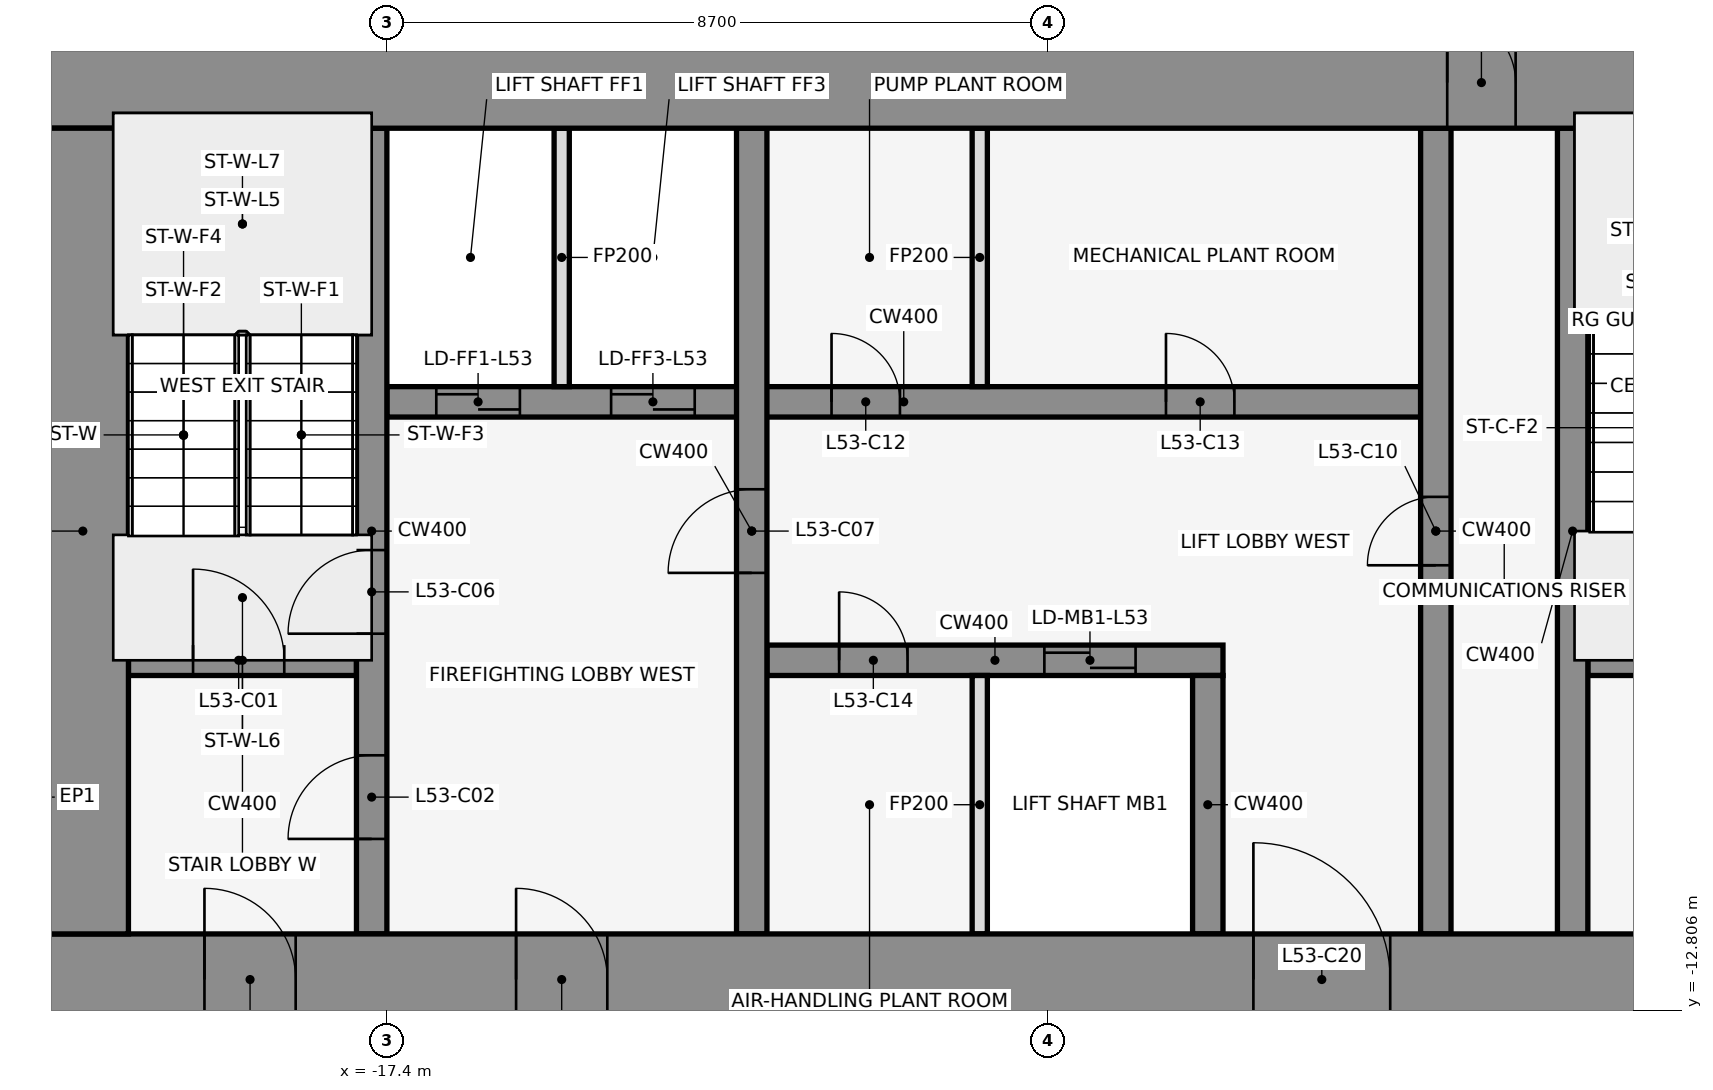
"""IFC4 building model, lengths in metres.
Left out: names, types, materials, properties, quantities, classifications, styles, units other than length and angle.
Written with IfcOpenShell. Run it as: python <this file> out.ifc"""

import sys

from ifc_helpers import new_model, si_unit, direction, frame, frame_2d, origin, place, context, subcontext, project, spatial, rectangle, extrude, element, fill, save


model = new_model("IFC4")
c1 = context("Model", 3, precision=1e-05, world=origin(), true_north=direction((0.0, 1.0)))
c2 = subcontext(c1, "Body", "Model", "MODEL_VIEW")
j1 = project(units=[si_unit("LENGTHUNIT", "METRE"), si_unit("PLANEANGLEUNIT", "RADIAN")], contexts=[c1])
p1 = place(None, origin())
s1 = spatial("IfcSite", under=j1, at=p1, CompositionType="ELEMENT")
p2 = place(p1, origin())
s2 = spatial("IfcBuilding", under=s1, at=p2, CompositionType="ELEMENT")
p3 = place(p2, frame((0.0, 0.0, 236.0)))
s3 = spatial("IfcBuildingStorey", under=s2, at=p3, CompositionType="ELEMENT", Elevation=236.0)
for number, where, z_axis, x_axis in (
    (1, (-0.068, -0.105, 0.0), (0.0, 0.0, 1.0), (-0.84, 0.543, 0.0)),
    (2, (-14.599, 1.08, 0.0), (0.0, 0.0, 1.0), (-0.84, -0.543, 0.0)),
):
    element("IfcWall", number, at=place(p3, frame(where, z_axis=z_axis, x_axis=x_axis)), inside=s3, PredefinedType="STANDARD", context=c2, shape_type="SweptSolid", body=[
        extrude(rectangle(XDim=2.183, YDim=0.25, at=frame_2d((1.091, 0.0))), origin(), (0.0, 0.0, 1.0), 5.25),
    ])
p4 = place(p3, frame((-20.8, -8.2, 0.0), z_axis=(0.0, 0.0, 1.0), x_axis=(1.0, 0.0, 0.0)))
e3 = element("IfcWall", 3, at=p4, inside=s3, PredefinedType="SHEAR", context=c2, shape_type="SweptSolid", body=[
    extrude(rectangle(XDim=3.0, YDim=0.4, at=frame_2d((1.5, 0.0))), origin(), (0.0, 0.0, 1.0), 5.4),
])
p5 = place(p4, frame((0.85, 0.0, 0.0)))
e4 = element("IfcOpeningElement", 4, at=p5, cuts=e3, PredefinedType="OPENING", context=c2, shape_type="SweptSolid", body=[
    extrude(rectangle(XDim=1.2, YDim=2.1, at=frame_2d((0.6, 1.05))), frame((0.0, 0.212, 0.0), z_axis=(0.0, -1.0, 0.0), x_axis=(1.0, 0.0, 0.0)), (0.0, 0.0, 1.0), 0.424),
])
p6 = place(p3, frame((-12.4, -8.2, 0.0), z_axis=(0.0, 0.0, 1.0), x_axis=(1.0, 0.0, 0.0)))
e5 = element("IfcWall", 5, at=p6, inside=s3, PredefinedType="SHEAR", context=c2, shape_type="SweptSolid", body=[
    extrude(rectangle(XDim=6.0, YDim=0.4, at=frame_2d((3.0, 0.0))), origin(), (0.0, 0.0, 1.0), 5.4),
])
p7 = place(p6, frame((3.65, 0.0, 0.0)))
e6 = element("IfcOpeningElement", 6, at=p7, cuts=e5, PredefinedType="OPENING", context=c2, shape_type="SweptSolid", body=[
    extrude(rectangle(XDim=1.2, YDim=2.1, at=frame_2d((0.6, 1.05))), frame((0.0, 0.212, 0.0), z_axis=(0.0, -1.0, 0.0), x_axis=(1.0, 0.0, 0.0)), (0.0, 0.0, 1.0), 0.424),
])
p8 = place(p6, frame((0.95, 0.0, 0.0)))
e7 = element("IfcOpeningElement", 7, at=p8, cuts=e5, PredefinedType="OPENING", context=c2, shape_type="SweptSolid", body=[
    extrude(rectangle(XDim=0.9, YDim=2.1, at=frame_2d((0.45, 1.05))), frame((0.0, 0.212, 0.0), z_axis=(0.0, -1.0, 0.0), x_axis=(1.0, 0.0, 0.0)), (0.0, 0.0, 1.0), 0.424),
])
p9 = place(p3, frame((-1.6, -8.2, 0.0), z_axis=(0.0, 0.0, 1.0), x_axis=(1.0, 0.0, 0.0)))
e8 = element("IfcWall", 8, at=p9, inside=s3, PredefinedType="SHEAR", context=c2, shape_type="SweptSolid", body=[
    extrude(rectangle(XDim=3.2, YDim=0.4, at=frame_2d((1.6, 0.0))), origin(), (0.0, 0.0, 1.0), 5.4),
])
p10 = place(p9, frame((1.05, 0.0, 0.0)))
e9 = element("IfcOpeningElement", 9, at=p10, cuts=e8, PredefinedType="OPENING", context=c2, shape_type="SweptSolid", body=[
    extrude(rectangle(XDim=1.2, YDim=2.1, at=frame_2d((0.6, 1.05))), frame((0.0, 0.212, 0.0), z_axis=(0.0, -1.0, 0.0), x_axis=(1.0, 0.0, 0.0)), (0.0, 0.0, 1.0), 0.424),
])
p11 = place(p3, frame((-17.4, -4.8, 0.0), z_axis=(0.0, 0.0, 1.0), x_axis=(1.0, 0.0, 0.0)))
e10 = element("IfcWall", 10, at=p11, inside=s3, PredefinedType="SHEAR", context=c2, shape_type="SweptSolid", body=[
    extrude(rectangle(XDim=13.6, YDim=0.4, at=frame_2d((6.8, 0.0))), origin(), (0.0, 0.0, 1.0), 5.4),
])
p12 = place(p11, frame((0.65, 0.0, 0.0)))
e11 = element("IfcOpeningElement", 11, at=p12, cuts=e10, PredefinedType="OPENING", context=c2, shape_type="SweptSolid", body=[
    extrude(rectangle(XDim=1.1, YDim=2.1, at=frame_2d((0.55, 1.05))), frame((0.0, 0.212, 0.0), z_axis=(0.0, -1.0, 0.0), x_axis=(1.0, 0.0, 0.0)), (0.0, 0.0, 1.0), 0.424),
])
p13 = place(p11, frame((2.95, 0.0, 0.0)))
e12 = element("IfcOpeningElement", 12, at=p13, cuts=e10, PredefinedType="OPENING", context=c2, shape_type="SweptSolid", body=[
    extrude(rectangle(XDim=1.1, YDim=2.1, at=frame_2d((0.55, 1.05))), frame((0.0, 0.212, 0.0), z_axis=(0.0, -1.0, 0.0), x_axis=(1.0, 0.0, 0.0)), (0.0, 0.0, 1.0), 0.424),
])
p14 = place(p11, frame((5.85, 0.0, 0.0)))
e13 = element("IfcOpeningElement", 13, at=p14, cuts=e10, PredefinedType="OPENING", context=c2, shape_type="SweptSolid", body=[
    extrude(rectangle(XDim=0.9, YDim=2.1, at=frame_2d((0.45, 1.05))), frame((0.0, 0.212, 0.0), z_axis=(0.0, -1.0, 0.0), x_axis=(1.0, 0.0, 0.0)), (0.0, 0.0, 1.0), 0.424),
])
p15 = place(p11, frame((10.25, 0.0, 0.0)))
e14 = element("IfcOpeningElement", 14, at=p15, cuts=e10, PredefinedType="OPENING", context=c2, shape_type="SweptSolid", body=[
    extrude(rectangle(XDim=0.9, YDim=2.1, at=frame_2d((0.45, 1.05))), frame((0.0, 0.212, 0.0), z_axis=(0.0, -1.0, 0.0), x_axis=(1.0, 0.0, 0.0)), (0.0, 0.0, 1.0), 0.424),
])
p16 = place(p3, frame((-17.6, -11.8, 0.0), z_axis=(0.0, 0.0, 1.0), x_axis=(0.0, 1.0, 0.0)))
e15 = element("IfcWall", 15, at=p16, inside=s3, PredefinedType="SHEAR", context=c2, shape_type="SweptSolid", body=[
    extrude(rectangle(XDim=10.6, YDim=0.4, at=frame_2d((5.3, 0.0))), origin(), (0.0, 0.0, 1.0), 5.4),
])
p17 = place(p16, frame((1.25, 0.0, 0.0)))
e16 = element("IfcOpeningElement", 16, at=p17, cuts=e15, PredefinedType="OPENING", context=c2, shape_type="SweptSolid", body=[
    extrude(rectangle(XDim=1.1, YDim=2.1, at=frame_2d((0.55, 1.05))), frame((0.0, 0.212, 0.0), z_axis=(0.0, -1.0, 0.0), x_axis=(1.0, 0.0, 0.0)), (0.0, 0.0, 1.0), 0.424),
])
p18 = place(p16, frame((3.95, 0.0, 0.0)))
e17 = element("IfcOpeningElement", 17, at=p18, cuts=e15, PredefinedType="OPENING", context=c2, shape_type="SweptSolid", body=[
    extrude(rectangle(XDim=1.1, YDim=2.1, at=frame_2d((0.55, 1.05))), frame((0.0, 0.212, 0.0), z_axis=(0.0, -1.0, 0.0), x_axis=(1.0, 0.0, 0.0)), (0.0, 0.0, 1.0), 0.424),
])
p19 = place(p3, frame((-15.1, -4.6, 0.0), z_axis=(0.0, 0.0, 1.0), x_axis=(0.0, 1.0, 0.0)))
e18 = element("IfcWall", 18, at=p19, inside=s3, PredefinedType="PARTITIONING", context=c2, shape_type="SweptSolid", body=[
    extrude(rectangle(XDim=3.4, YDim=0.2, at=frame_2d((1.7, 0.0))), origin(), (0.0, 0.0, 1.0), 4.318),
])
p20 = place(p3, frame((-12.6, -11.8, 0.0), z_axis=(0.0, 0.0, 1.0), x_axis=(0.0, 1.0, 0.0)))
e19 = element("IfcWall", 19, at=p20, inside=s3, PredefinedType="SHEAR", context=c2, shape_type="SweptSolid", body=[
    extrude(rectangle(XDim=10.6, YDim=0.4, at=frame_2d((5.3, 0.0))), origin(), (0.0, 0.0, 1.0), 5.4),
])
p21 = place(p20, frame((4.75, 0.0, 0.0)))
e20 = element("IfcOpeningElement", 20, at=p21, cuts=e19, PredefinedType="OPENING", context=c2, shape_type="SweptSolid", body=[
    extrude(rectangle(XDim=1.1, YDim=2.1, at=frame_2d((0.55, 1.05))), frame((0.0, 0.212, 0.0), z_axis=(0.0, -1.0, 0.0), x_axis=(1.0, 0.0, 0.0)), (0.0, 0.0, 1.0), 0.424),
])
for number, where, z_axis, x_axis in (
    (21, (-9.6, -11.8, 0.0), (0.0, 0.0, 1.0), (0.0, 1.0, 0.0)),
    (22, (-9.6, -4.6, 0.0), (0.0, 0.0, 1.0), (0.0, 1.0, 0.0)),
):
    element("IfcWall", number, at=place(p3, frame(where, z_axis=z_axis, x_axis=x_axis)), inside=s3, PredefinedType="PARTITIONING", context=c2, shape_type="SweptSolid", body=[
        extrude(rectangle(XDim=3.4, YDim=0.2, at=frame_2d((1.7, 0.0))), origin(), (0.0, 0.0, 1.0), 4.318),
    ])
p22 = place(p3, frame((-6.6, -11.8, 0.0), z_axis=(0.0, 0.0, 1.0), x_axis=(0.0, 1.0, 0.0)))
e23 = element("IfcWall", 23, at=p22, inside=s3, PredefinedType="SHEAR", context=c2, shape_type="SweptSolid", body=[
    extrude(rectangle(XDim=3.4, YDim=0.4, at=frame_2d((1.7, 0.0))), origin(), (0.0, 0.0, 1.0), 5.4),
])
p23 = place(p3, frame((-3.6, -11.8, 0.0), z_axis=(0.0, 0.0, 1.0), x_axis=(0.0, 1.0, 0.0)))
e24 = element("IfcWall", 24, at=p23, inside=s3, PredefinedType="SHEAR", context=c2, shape_type="SweptSolid", body=[
    extrude(rectangle(XDim=10.6, YDim=0.4, at=frame_2d((5.3, 0.0))), origin(), (0.0, 0.0, 1.0), 5.4),
])
p24 = place(p23, frame((4.85, 0.0, 0.0)))
e25 = element("IfcOpeningElement", 25, at=p24, cuts=e24, PredefinedType="OPENING", context=c2, shape_type="SweptSolid", body=[
    extrude(rectangle(XDim=0.9, YDim=2.1, at=frame_2d((0.45, 1.05))), frame((0.0, 0.212, 0.0), z_axis=(0.0, -1.0, 0.0), x_axis=(1.0, 0.0, 0.0)), (0.0, 0.0, 1.0), 0.424),
])
p25 = place(p3, frame((-1.8, -11.8, 0.0), z_axis=(0.0, 0.0, 1.0), x_axis=(0.0, 1.0, 0.0)))
e26 = element("IfcWall", 26, at=p25, inside=s3, PredefinedType="SHEAR", context=c2, shape_type="SweptSolid", body=[
    extrude(rectangle(XDim=10.6, YDim=0.4, at=frame_2d((5.3, 0.0))), origin(), (0.0, 0.0, 1.0), 5.4),
])
p26 = place(p3, frame((-22.0, -0.6, 0.0), z_axis=(0.0, 0.0, 1.0), x_axis=(1.0, 0.0, 0.0)))
e27 = element("IfcWall", 27, at=p26, inside=s3, PredefinedType="SHEAR", context=c2, shape_type="SweptSolid", body=[
    extrude(rectangle(XDim=44.0, YDim=1.2, at=frame_2d((22.0, 0.0))), origin(), (0.0, 0.0, 1.0), 5.4),
])
p27 = place(p26, frame((18.55, 0.0, 0.0)))
e28 = element("IfcOpeningElement", 28, at=p27, cuts=e27, PredefinedType="OPENING", context=c2, shape_type="SweptSolid", body=[
    extrude(rectangle(XDim=0.9, YDim=2.1, at=frame_2d((0.45, 1.05))), frame((0.0, 0.612, 0.0), z_axis=(0.0, -1.0, 0.0), x_axis=(1.0, 0.0, 0.0)), (0.0, 0.0, 1.0), 1.224),
])
p28 = place(p26, frame((24.55, 0.0, 0.0)))
e29 = element("IfcOpeningElement", 29, at=p28, cuts=e27, PredefinedType="OPENING", context=c2, shape_type="SweptSolid", body=[
    extrude(rectangle(XDim=0.9, YDim=2.1, at=frame_2d((0.45, 1.05))), frame((0.0, 0.612, 0.0), z_axis=(0.0, -1.0, 0.0), x_axis=(1.0, 0.0, 0.0)), (0.0, 0.0, 1.0), 1.224),
])
p29 = place(p3, frame((-22.0, -12.4, 0.0), z_axis=(0.0, 0.0, 1.0), x_axis=(1.0, 0.0, 0.0)))
e30 = element("IfcWall", 30, at=p29, inside=s3, PredefinedType="SHEAR", context=c2, shape_type="SweptSolid", body=[
    extrude(rectangle(XDim=44.0, YDim=1.2, at=frame_2d((22.0, 0.0))), origin(), (0.0, 0.0, 1.0), 5.4),
])
p30 = place(p29, frame((2.2, 0.0, 0.0)))
e31 = element("IfcOpeningElement", 31, at=p30, cuts=e30, PredefinedType="OPENING", context=c2, shape_type="SweptSolid", body=[
    extrude(rectangle(XDim=1.2, YDim=2.1, at=frame_2d((0.6, 1.05))), frame((0.0, 0.612, 0.0), z_axis=(0.0, -1.0, 0.0), x_axis=(1.0, 0.0, 0.0)), (0.0, 0.0, 1.0), 1.224),
])
p31 = place(p29, frame((21.4, 0.0, 0.0)))
e32 = element("IfcOpeningElement", 32, at=p31, cuts=e30, PredefinedType="OPENING", context=c2, shape_type="SweptSolid", body=[
    extrude(rectangle(XDim=1.2, YDim=2.1, at=frame_2d((0.6, 1.05))), frame((0.0, 0.612, 0.0), z_axis=(0.0, -1.0, 0.0), x_axis=(1.0, 0.0, 0.0)), (0.0, 0.0, 1.0), 1.224),
])
p32 = place(p29, frame((40.6, 0.0, 0.0)))
e33 = element("IfcOpeningElement", 33, at=p32, cuts=e30, PredefinedType="OPENING", context=c2, shape_type="SweptSolid", body=[
    extrude(rectangle(XDim=1.2, YDim=2.1, at=frame_2d((0.6, 1.05))), frame((0.0, 0.612, 0.0), z_axis=(0.0, -1.0, 0.0), x_axis=(1.0, 0.0, 0.0)), (0.0, 0.0, 1.0), 1.224),
])
p33 = place(p29, frame((16.0, 0.0, 0.0)))
e34 = element("IfcOpeningElement", 34, at=p33, cuts=e30, PredefinedType="OPENING", context=c2, shape_type="SweptSolid", body=[
    extrude(rectangle(XDim=1.8, YDim=2.1, at=frame_2d((0.9, 1.05))), frame((0.0, 0.612, 0.0), z_axis=(0.0, -1.0, 0.0), x_axis=(1.0, 0.0, 0.0)), (0.0, 0.0, 1.0), 1.224),
])
p34 = place(p29, frame((6.3, 0.0, 0.0)))
e35 = element("IfcOpeningElement", 35, at=p34, cuts=e30, PredefinedType="OPENING", context=c2, shape_type="SweptSolid", body=[
    extrude(rectangle(XDim=1.2, YDim=2.1, at=frame_2d((0.6, 1.05))), frame((0.0, 0.612, 0.0), z_axis=(0.0, -1.0, 0.0), x_axis=(1.0, 0.0, 0.0)), (0.0, 0.0, 1.0), 1.224),
])
p35 = place(p29, frame((26.2, 0.0, 0.0)))
e36 = element("IfcOpeningElement", 36, at=p35, cuts=e30, PredefinedType="OPENING", context=c2, shape_type="SweptSolid", body=[
    extrude(rectangle(XDim=1.8, YDim=2.1, at=frame_2d((0.9, 1.05))), frame((0.0, 0.612, 0.0), z_axis=(0.0, -1.0, 0.0), x_axis=(1.0, 0.0, 0.0)), (0.0, 0.0, 1.0), 1.224),
])
p36 = place(p29, frame((36.5, 0.0, 0.0)))
e37 = element("IfcOpeningElement", 37, at=p36, cuts=e30, PredefinedType="OPENING", context=c2, shape_type="SweptSolid", body=[
    extrude(rectangle(XDim=1.2, YDim=2.1, at=frame_2d((0.6, 1.05))), frame((0.0, 0.612, 0.0), z_axis=(0.0, -1.0, 0.0), x_axis=(1.0, 0.0, 0.0)), (0.0, 0.0, 1.0), 1.224),
])
p37 = place(p3, frame((-21.4, -11.8, 0.0), z_axis=(0.0, 0.0, 1.0), x_axis=(0.0, 1.0, 0.0)))
e38 = element("IfcWall", 38, at=p37, inside=s3, PredefinedType="SHEAR", context=c2, shape_type="SweptSolid", body=[
    extrude(rectangle(XDim=10.6, YDim=1.2, at=frame_2d((5.3, 0.0))), origin(), (0.0, 0.0, 1.0), 5.4),
])
p38 = place(p5, origin())
e39 = element("IfcDoor", 39, at=p38, inside=s3, OperationType="SINGLE_SWING_LEFT", PredefinedType="DOOR", context=c2, shape_type="SweptSolid", body=[
    extrude(rectangle(XDim=1.2, YDim=2.1, at=frame_2d((0.6, 1.05))), frame((0.0, 0.025, 0.0), z_axis=(0.0, -1.0, 0.0), x_axis=(1.0, 0.0, 0.0)), (0.0, 0.0, 1.0), 0.05),
])
fill(e4, e39)
p39 = place(p17, frame((1.1, 0.0, 0.0), z_axis=(0.0, 0.0, 1.0), x_axis=(-1.0, 0.0, 0.0)))
e40 = element("IfcDoor", 40, at=p39, inside=s3, OperationType="SINGLE_SWING_LEFT", PredefinedType="DOOR", context=c2, shape_type="SweptSolid", body=[
    extrude(rectangle(XDim=1.1, YDim=2.1, at=frame_2d((0.55, 1.05))), frame((0.0, 0.025, 0.0), z_axis=(0.0, -1.0, 0.0), x_axis=(1.0, 0.0, 0.0)), (0.0, 0.0, 1.0), 0.05),
])
fill(e16, e40)
p40 = place(p12, origin())
e41 = element("IfcDoor", 41, at=p40, inside=s3, OperationType="DOUBLE_DOOR_SLIDING", PredefinedType="DOOR", context=c2, shape_type="SweptSolid", body=[
    extrude(rectangle(XDim=1.1, YDim=2.1, at=frame_2d((0.55, 1.05))), frame((0.0, 0.025, 0.0), z_axis=(0.0, -1.0, 0.0), x_axis=(1.0, 0.0, 0.0)), (0.0, 0.0, 1.0), 0.05),
])
fill(e11, e41)
p41 = place(p13, origin())
e42 = element("IfcDoor", 42, at=p41, inside=s3, OperationType="DOUBLE_DOOR_SLIDING", PredefinedType="DOOR", context=c2, shape_type="SweptSolid", body=[
    extrude(rectangle(XDim=1.1, YDim=2.1, at=frame_2d((0.55, 1.05))), frame((0.0, 0.025, 0.0), z_axis=(0.0, -1.0, 0.0), x_axis=(1.0, 0.0, 0.0)), (0.0, 0.0, 1.0), 0.05),
])
fill(e12, e42)
p42 = place(p7, origin())
e43 = element("IfcDoor", 43, at=p42, inside=s3, OperationType="DOUBLE_DOOR_SLIDING", PredefinedType="DOOR", context=c2, shape_type="SweptSolid", body=[
    extrude(rectangle(XDim=1.2, YDim=2.1, at=frame_2d((0.6, 1.05))), frame((0.0, 0.025, 0.0), z_axis=(0.0, -1.0, 0.0), x_axis=(1.0, 0.0, 0.0)), (0.0, 0.0, 1.0), 0.05),
])
fill(e6, e43)
p43 = place(p18, frame((1.1, 0.0, 0.0), z_axis=(0.0, 0.0, 1.0), x_axis=(-1.0, 0.0, 0.0)))
e44 = element("IfcDoor", 44, at=p43, inside=s3, OperationType="SINGLE_SWING_LEFT", PredefinedType="DOOR", context=c2, shape_type="SweptSolid", body=[
    extrude(rectangle(XDim=1.1, YDim=2.1, at=frame_2d((0.55, 1.05))), frame((0.0, 0.025, 0.0), z_axis=(0.0, -1.0, 0.0), x_axis=(1.0, 0.0, 0.0)), (0.0, 0.0, 1.0), 0.05),
])
fill(e17, e44)
p44 = place(p21, origin())
e45 = element("IfcDoor", 45, at=p44, inside=s3, OperationType="SINGLE_SWING_LEFT", PredefinedType="DOOR", context=c2, shape_type="SweptSolid", body=[
    extrude(rectangle(XDim=1.1, YDim=2.1, at=frame_2d((0.55, 1.05))), frame((0.0, 0.025, 0.0), z_axis=(0.0, -1.0, 0.0), x_axis=(1.0, 0.0, 0.0)), (0.0, 0.0, 1.0), 0.05),
])
fill(e20, e45)
p45 = place(p24, frame((0.9, 0.0, 0.0), z_axis=(0.0, 0.0, 1.0), x_axis=(-1.0, 0.0, 0.0)))
e46 = element("IfcDoor", 46, at=p45, inside=s3, OperationType="SINGLE_SWING_LEFT", PredefinedType="DOOR", context=c2, shape_type="SweptSolid", body=[
    extrude(rectangle(XDim=0.9, YDim=2.1, at=frame_2d((0.45, 1.05))), frame((0.0, 0.025, 0.0), z_axis=(0.0, -1.0, 0.0), x_axis=(1.0, 0.0, 0.0)), (0.0, 0.0, 1.0), 0.05),
])
fill(e25, e46)
p46 = place(p14, origin())
e47 = element("IfcDoor", 47, at=p46, inside=s3, OperationType="SINGLE_SWING_RIGHT", PredefinedType="DOOR", context=c2, shape_type="SweptSolid", body=[
    extrude(rectangle(XDim=0.9, YDim=2.1, at=frame_2d((0.45, 1.05))), frame((0.0, 0.025, 0.0), z_axis=(0.0, -1.0, 0.0), x_axis=(1.0, 0.0, 0.0)), (0.0, 0.0, 1.0), 0.05),
])
fill(e13, e47)
p47 = place(p15, origin())
e48 = element("IfcDoor", 48, at=p47, inside=s3, OperationType="SINGLE_SWING_LEFT", PredefinedType="DOOR", context=c2, shape_type="SweptSolid", body=[
    extrude(rectangle(XDim=0.9, YDim=2.1, at=frame_2d((0.45, 1.05))), frame((0.0, 0.025, 0.0), z_axis=(0.0, -1.0, 0.0), x_axis=(1.0, 0.0, 0.0)), (0.0, 0.0, 1.0), 0.05),
])
fill(e14, e48)
p48 = place(p8, frame((0.9, 0.0, 0.0), z_axis=(0.0, 0.0, 1.0), x_axis=(-1.0, 0.0, 0.0)))
e49 = element("IfcDoor", 49, at=p48, inside=s3, OperationType="SINGLE_SWING_LEFT", PredefinedType="DOOR", context=c2, shape_type="SweptSolid", body=[
    extrude(rectangle(XDim=0.9, YDim=2.1, at=frame_2d((0.45, 1.05))), frame((0.0, 0.025, 0.0), z_axis=(0.0, -1.0, 0.0), x_axis=(1.0, 0.0, 0.0)), (0.0, 0.0, 1.0), 0.05),
])
fill(e7, e49)
p49 = place(p27, origin())
e50 = element("IfcDoor", 50, at=p49, inside=s3, OperationType="SINGLE_SWING_LEFT", PredefinedType="DOOR", context=c2, shape_type="SweptSolid", body=[
    extrude(rectangle(XDim=0.9, YDim=2.1, at=frame_2d((0.45, 1.05))), frame((0.0, 0.025, 0.0), z_axis=(0.0, -1.0, 0.0), x_axis=(1.0, 0.0, 0.0)), (0.0, 0.0, 1.0), 0.05),
])
fill(e28, e50)
p50 = place(p30, frame((1.2, 0.0, 0.0), z_axis=(0.0, 0.0, 1.0), x_axis=(-1.0, 0.0, 0.0)))
e51 = element("IfcDoor", 51, at=p50, inside=s3, OperationType="SINGLE_SWING_RIGHT", PredefinedType="DOOR", context=c2, shape_type="SweptSolid", body=[
    extrude(rectangle(XDim=1.2, YDim=2.1, at=frame_2d((0.6, 1.05))), frame((0.0, 0.025, 0.0), z_axis=(0.0, -1.0, 0.0), x_axis=(1.0, 0.0, 0.0)), (0.0, 0.0, 1.0), 0.05),
])
fill(e31, e51)
p51 = place(p33, origin())
e52 = element("IfcDoor", 52, at=p51, inside=s3, OperationType="SINGLE_SWING_LEFT", PredefinedType="DOOR", context=c2, shape_type="SweptSolid", body=[
    extrude(rectangle(XDim=1.8, YDim=2.1, at=frame_2d((0.9, 1.05))), frame((0.0, 0.025, 0.0), z_axis=(0.0, -1.0, 0.0), x_axis=(1.0, 0.0, 0.0)), (0.0, 0.0, 1.0), 0.05),
])
fill(e34, e52)
p52 = place(p34, frame((1.2, 0.0, 0.0), z_axis=(0.0, 0.0, 1.0), x_axis=(-1.0, 0.0, 0.0)))
e53 = element("IfcDoor", 53, at=p52, inside=s3, OperationType="SINGLE_SWING_RIGHT", PredefinedType="DOOR", context=c2, shape_type="SweptSolid", body=[
    extrude(rectangle(XDim=1.2, YDim=2.1, at=frame_2d((0.6, 1.05))), frame((0.0, 0.025, 0.0), z_axis=(0.0, -1.0, 0.0), x_axis=(1.0, 0.0, 0.0)), (0.0, 0.0, 1.0), 0.05),
])
fill(e35, e53)
save(model, sys.argv[1])
